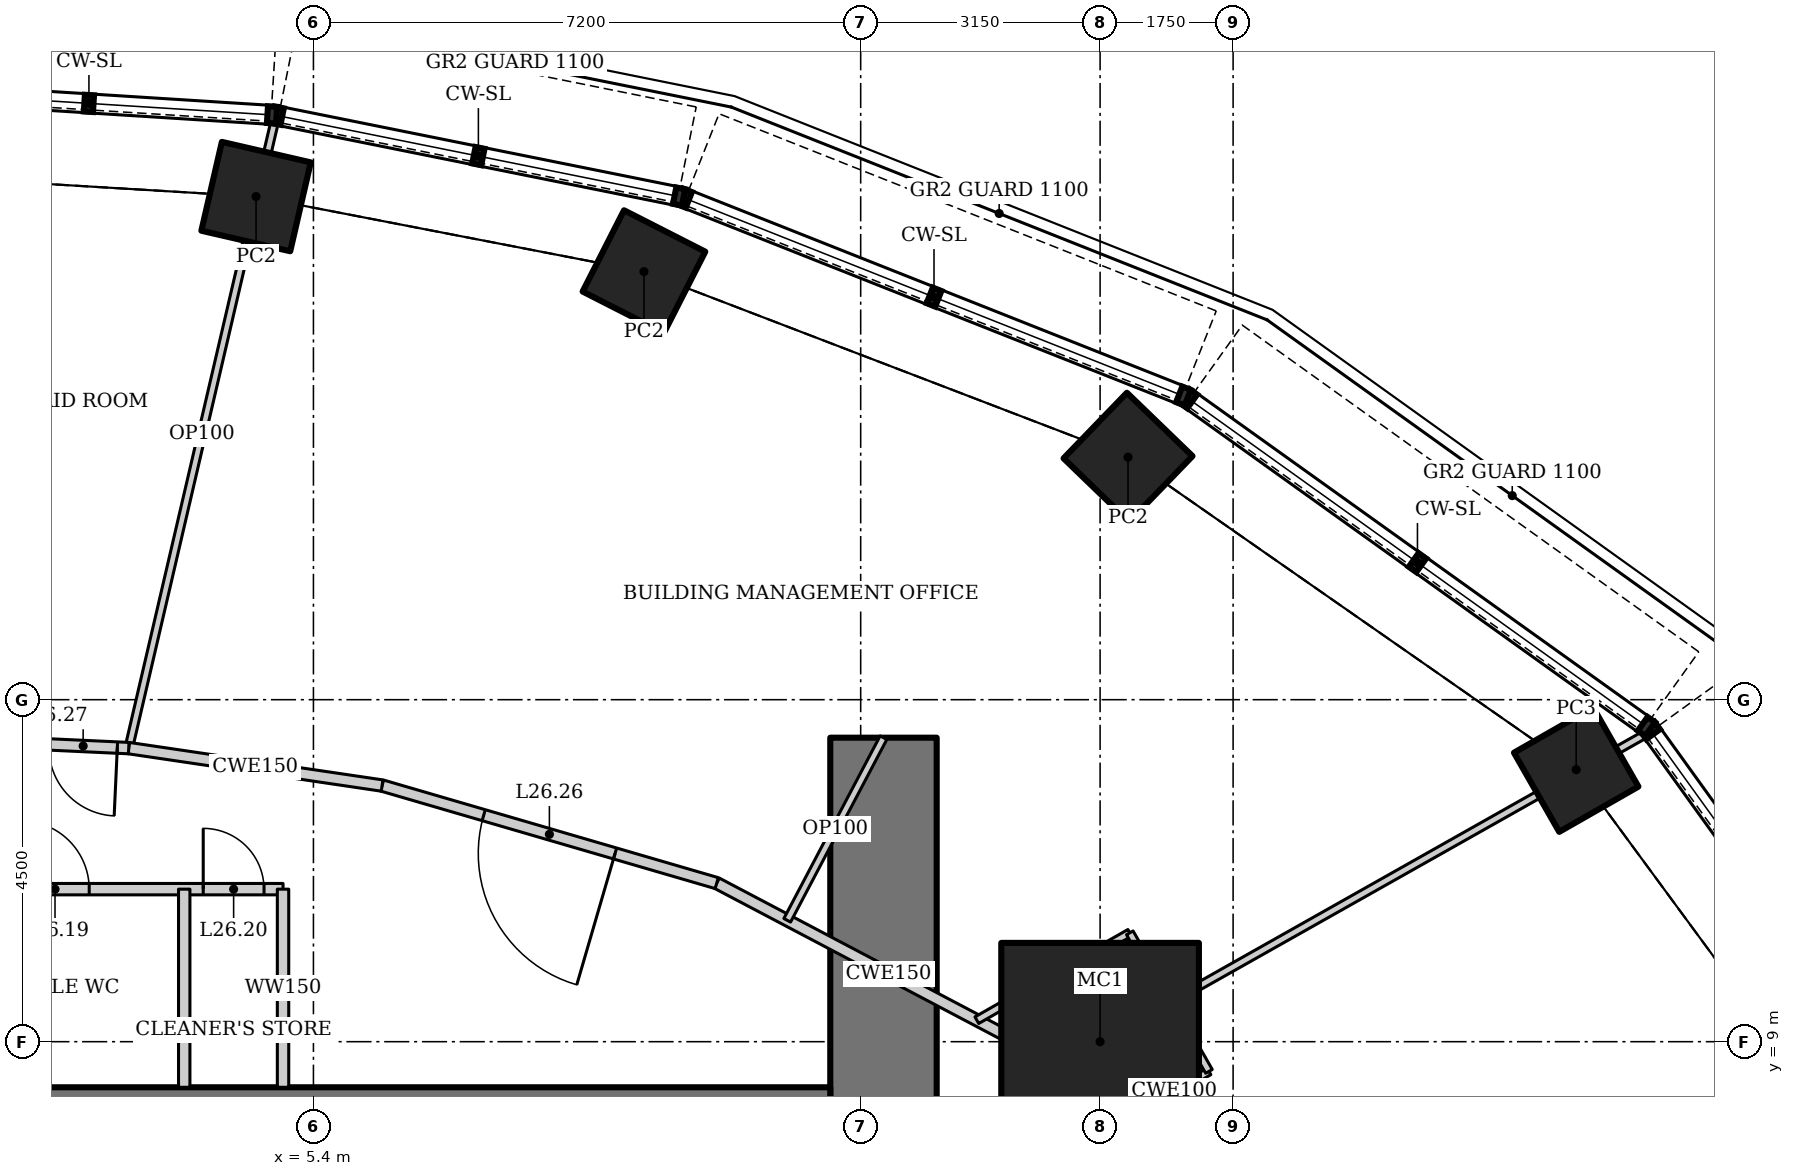
"""IFC4 building model, lengths in metres.
Left out: names, types, materials, properties, quantities, classifications, styles, units other than length and angle.
Written with IfcOpenShell. Run it as: python <this file> out.ifc"""

import sys

from ifc_helpers import new_model, si_unit, direction, frame, frame_2d, origin, origin_2d, place, context, subcontext, project, spatial, rectangle, hollow_rectangle, extrude, element, fill, save


model = new_model("IFC4")
c1 = context("Model", 3, precision=1e-05, world=origin(), true_north=direction((0.0, 1.0)))
c2 = subcontext(c1, "Body", "Model", "MODEL_VIEW")
j1 = project(units=[si_unit("LENGTHUNIT", "METRE"), si_unit("PLANEANGLEUNIT", "RADIAN")], contexts=[c1])
p1 = place(None, origin())
s1 = spatial("IfcSite", under=j1, at=p1, CompositionType="ELEMENT")
p2 = place(p1, origin())
s2 = spatial("IfcBuilding", under=s1, at=p2, CompositionType="ELEMENT")
p3 = place(p2, frame((0.0, 0.0, 111.4)))
s3 = spatial("IfcBuildingStorey", under=s2, at=p3, CompositionType="ELEMENT", Elevation=111.4)
p4 = place(p3, frame((15.75, 9.0, 0.0), z_axis=(0.0, 0.0, 1.0), x_axis=(1.0, 0.0, 0.0)))
e1 = element("IfcColumn", 1, at=p4, inside=s3, PredefinedType="COLUMN", context=c2, shape_type="SweptSolid", body=[
    extrude(hollow_rectangle(XDim=2.6, YDim=2.6, WallThickness=0.13, at=origin_2d()), origin(), (0.0, 0.0, 1.0), 6.0),
])
p5 = place(p3, frame((22.014, 12.579, 1.142), z_axis=(0.0, 0.0, 1.0), x_axis=(0.86824298017, 0.496139221777, 0.0)))
e2 = element("IfcColumn", 2, at=p5, inside=s3, PredefinedType="COLUMN", context=c2, shape_type="SweptSolid", body=[
    extrude(hollow_rectangle(XDim=1.2, YDim=1.2, WallThickness=0.12, at=origin_2d()), origin(), (0.0, 0.0, 1.0), 4.858),
])
p6 = place(p3, frame((16.118, 16.69, 1.155), z_axis=(0.0, 0.0, 1.0), x_axis=(0.694658370459, 0.719339800339, 0.0)))
e3 = element("IfcColumn", 3, at=p6, inside=s3, PredefinedType="COLUMN", context=c2, shape_type="SweptSolid", body=[
    extrude(hollow_rectangle(XDim=1.2, YDim=1.2, WallThickness=0.1, at=origin_2d()), origin(), (0.0, 0.0, 1.0), 4.845),
])
p7 = place(p3, frame((9.749, 19.133, 1.165), z_axis=(0.0, 0.0, 1.0), x_axis=(0.45399049974, 0.891006524188, 0.0)))
e4 = element("IfcColumn", 4, at=p7, inside=s3, PredefinedType="COLUMN", context=c2, shape_type="SweptSolid", body=[
    extrude(hollow_rectangle(XDim=1.2, YDim=1.2, WallThickness=0.1, at=origin_2d()), origin(), (0.0, 0.0, 1.0), 4.835),
])
p8 = place(p3, frame((4.645, 20.12, 1.17), z_axis=(0.0, 0.0, 1.0), x_axis=(0.224951054344, 0.974370064785, 0.0)))
e5 = element("IfcColumn", 5, at=p8, inside=s3, PredefinedType="COLUMN", context=c2, shape_type="SweptSolid", body=[
    extrude(hollow_rectangle(XDim=1.2, YDim=1.2, WallThickness=0.1, at=origin_2d()), origin(), (0.0, 0.0, 1.0), 4.83),
])
p9 = place(p3, frame((12.9, -13.0, 0.0), z_axis=(0.0, 0.0, 1.0), x_axis=(0.0, 1.0, 0.0)))
e6 = element("IfcWall", 6, at=p9, inside=s3, PredefinedType="SHEAR", context=c2, shape_type="SweptSolid", body=[
    extrude(rectangle(XDim=26.0, YDim=1.4, at=frame_2d((13.0, 0.0))), origin(), (0.0, 0.0, 1.0), 6.0),
])
p10 = place(p9, frame((13.75, 0.0, 0.0)))
e7 = element("IfcOpeningElement", 7, at=p10, cuts=e6, PredefinedType="OPENING", context=c2, shape_type="SweptSolid", body=[
    extrude(rectangle(XDim=1.8, YDim=2.1, at=frame_2d((0.9, 1.05))), frame((0.0, 0.71, 0.0), z_axis=(0.0, -1.0, 0.0), x_axis=(1.0, 0.0, 0.0)), (0.0, 0.0, 1.0), 1.42),
])
p11 = place(p3, frame((12.2, 7.6, 0.0), z_axis=(0.0, 0.0, 1.0), x_axis=(-1.0, 0.0, 0.0)))
e8 = element("IfcWall", 8, at=p11, inside=s3, PredefinedType="SHEAR", context=c2, shape_type="SweptSolid", body=[
    extrude(rectangle(XDim=24.4, YDim=1.6, at=frame_2d((12.2, 0.0))), origin(), (0.0, 0.0, 1.0), 6.0),
])
p12 = place(p3, frame((22.949, 13.059, 0.0), z_axis=(0.0, 0.0, 1.0), x_axis=(-0.870889908693, -0.491478144923, 0.0)))
e9 = element("IfcWall", 9, at=p12, inside=s3, PredefinedType="PARTITIONING", context=c2, shape_type="SweptSolid", body=[
    extrude(rectangle(XDim=8.865, YDim=0.1, at=frame_2d((4.432, 0.0))), origin(), (0.0, 0.0, 1.0), 4.65),
])
p13 = place(p3, frame((4.897, 21.135, 0.0), z_axis=(0.0, 0.0, 1.0), x_axis=(-0.226907932986, -0.973916213002, 0.0)))
e10 = element("IfcWall", 10, at=p13, inside=s3, PredefinedType="PARTITIONING", context=c2, shape_type="SweptSolid", body=[
    extrude(rectangle(XDim=8.493, YDim=0.1, at=frame_2d((4.247, 0.0))), origin(), (0.0, 0.0, 1.0), 5.149),
])
p14 = place(p3, frame((19.078, 4.757, 0.0), z_axis=(0.0, 0.0, 1.0), x_axis=(-0.698305033542, 0.715800307439, 0.0)))
e11 = element("IfcWall", 11, at=p14, inside=s3, PredefinedType="PARTITIONING", context=c2, shape_type="SweptSolid", body=[
    extrude(rectangle(XDim=5.512, YDim=0.15, at=frame_2d((2.756, 0.0))), origin(), (0.0, 0.0, 1.0), 5.85),
])
p15 = place(p14, frame((0.15, 0.0, 0.0)))
e12 = element("IfcOpeningElement", 12, at=p15, cuts=e11, PredefinedType="OPENING", context=c2, shape_type="SweptSolid", body=[
    extrude(rectangle(XDim=0.9, YDim=2.1, at=frame_2d((0.45, 1.05))), frame((0.0, 0.085, 0.0), z_axis=(0.0, -1.0, 0.0), x_axis=(1.0, 0.0, 0.0)), (0.0, 0.0, 1.0), 0.17),
])
p16 = place(p3, frame((15.229, 8.702, 0.0), z_axis=(0.0, 0.0, 1.0), x_axis=(-0.884643590306, 0.466267860924, 0.0)))
e13 = element("IfcWall", 13, at=p16, inside=s3, PredefinedType="PARTITIONING", context=c2, shape_type="SweptSolid", body=[
    extrude(rectangle(XDim=5.113, YDim=0.15, at=frame_2d((2.557, 0.0))), origin(), (0.0, 0.0, 1.0), 5.85),
])
p17 = place(p3, frame((10.706, 11.086, 0.0), z_axis=(0.0, 0.0, 1.0), x_axis=(-0.96001728753, 0.279940721659, 0.0)))
e14 = element("IfcWall", 14, at=p17, inside=s3, PredefinedType="PARTITIONING", context=c2, shape_type="SweptSolid", body=[
    extrude(rectangle(XDim=4.586, YDim=0.15, at=frame_2d((2.293, 0.0))), origin(), (0.0, 0.0, 1.0), 5.85),
])
p18 = place(p17, frame((1.393, 0.0, 0.0)))
e15 = element("IfcOpeningElement", 15, at=p18, cuts=e14, PredefinedType="OPENING", context=c2, shape_type="SweptSolid", body=[
    extrude(rectangle(XDim=1.8, YDim=2.1, at=frame_2d((0.9, 1.05))), frame((0.0, 0.085, 0.0), z_axis=(0.0, -1.0, 0.0), x_axis=(1.0, 0.0, 0.0)), (0.0, 0.0, 1.0), 0.17),
])
p19 = place(p3, frame((6.303, 12.37, 0.0), z_axis=(0.0, 0.0, 1.0), x_axis=(-0.989262902935, 0.146146874329, 0.0)))
e16 = element("IfcWall", 16, at=p19, inside=s3, PredefinedType="PARTITIONING", context=c2, shape_type="SweptSolid", body=[
    extrude(rectangle(XDim=3.369, YDim=0.15, at=frame_2d((1.685, 0.0))), origin(), (0.0, 0.0, 1.0), 5.85),
])
p20 = place(p3, frame((2.97, 12.863, 0.0), z_axis=(0.0, 0.0, 1.0), x_axis=(-0.998934397568, 0.046152674403, 0.0)))
e17 = element("IfcWall", 17, at=p20, inside=s3, PredefinedType="PARTITIONING", context=c2, shape_type="SweptSolid", body=[
    extrude(rectangle(XDim=2.973, YDim=0.15, at=frame_2d((1.486, 0.0))), origin(), (0.0, 0.0, 1.0), 5.85),
])
p21 = place(p20, frame((0.15, 0.0, 0.0)))
e18 = element("IfcOpeningElement", 18, at=p21, cuts=e17, PredefinedType="OPENING", context=c2, shape_type="SweptSolid", body=[
    extrude(rectangle(XDim=0.9, YDim=2.1, at=frame_2d((0.45, 1.05))), frame((0.0, 0.085, 0.0), z_axis=(0.0, -1.0, 0.0), x_axis=(1.0, 0.0, 0.0)), (0.0, 0.0, 1.0), 0.17),
])
p22 = place(p3, frame((-5.0, 11.007, 0.0), z_axis=(0.0, 0.0, 1.0), x_axis=(1.0, 0.0, 0.0)))
e19 = element("IfcWall", 19, at=p22, inside=s3, PredefinedType="SOLIDWALL", context=c2, shape_type="SweptSolid", body=[
    extrude(rectangle(XDim=10.0, YDim=0.15, at=frame_2d((5.0, 0.0))), origin(), (0.0, 0.0, 1.0), 5.85),
])
p23 = place(p22, frame((0.45, 0.0, 0.0)))
e20 = element("IfcOpeningElement", 20, at=p23, cuts=e19, PredefinedType="OPENING", context=c2, shape_type="SweptSolid", body=[
    extrude(rectangle(XDim=1.0, YDim=2.1, at=frame_2d((0.5, 1.05))), frame((0.0, 0.085, 0.0), z_axis=(0.0, -1.0, 0.0), x_axis=(1.0, 0.0, 0.0)), (0.0, 0.0, 1.0), 0.17),
])
p24 = place(p22, frame((3.15, 0.0, 0.0)))
e21 = element("IfcOpeningElement", 21, at=p24, cuts=e19, PredefinedType="OPENING", context=c2, shape_type="SweptSolid", body=[
    extrude(rectangle(XDim=0.9, YDim=2.1, at=frame_2d((0.45, 1.05))), frame((0.0, 0.085, 0.0), z_axis=(0.0, -1.0, 0.0), x_axis=(1.0, 0.0, 0.0)), (0.0, 0.0, 1.0), 0.17),
])
p25 = place(p22, frame((6.55, 0.0, 0.0)))
e22 = element("IfcOpeningElement", 22, at=p25, cuts=e19, PredefinedType="OPENING", context=c2, shape_type="SweptSolid", body=[
    extrude(rectangle(XDim=0.9, YDim=2.1, at=frame_2d((0.45, 1.05))), frame((0.0, 0.085, 0.0), z_axis=(0.0, -1.0, 0.0), x_axis=(1.0, 0.0, 0.0)), (0.0, 0.0, 1.0), 0.17),
])
p26 = place(p22, frame((8.95, 0.0, 0.0)))
e23 = element("IfcOpeningElement", 23, at=p26, cuts=e19, PredefinedType="OPENING", context=c2, shape_type="SweptSolid", body=[
    extrude(rectangle(XDim=0.8, YDim=2.1, at=frame_2d((0.4, 1.05))), frame((0.0, 0.085, 0.0), z_axis=(0.0, -1.0, 0.0), x_axis=(1.0, 0.0, 0.0)), (0.0, 0.0, 1.0), 0.17),
])
for number, where, z_axis, x_axis in (
    (24, (5.0, 8.4, 0.0), (0.0, 0.0, 1.0), (0.0, 1.0, 0.0)),
    (25, (3.7, 8.4, 0.0), (0.0, 0.0, 1.0), (0.0, 1.0, 0.0)),
):
    element("IfcWall", number, at=place(p3, frame(where, z_axis=z_axis, x_axis=x_axis)), inside=s3, PredefinedType="SOLIDWALL", context=c2, shape_type="SweptSolid", body=[
        extrude(rectangle(XDim=2.607, YDim=0.15, at=frame_2d((1.304, 0.0))), origin(), (0.0, 0.0, 1.0), 5.85),
    ])
p27 = place(p3, frame((17.183, 8.609, 0.0), z_axis=(0.0, 0.0, 1.0), x_axis=(-0.868214523334, -0.496189017888, 0.0)))
e26 = element("IfcWall", 26, at=p27, inside=s3, PredefinedType="PARTITIONING", context=c2, shape_type="SweptSolid", body=[
    extrude(rectangle(XDim=1.05, YDim=0.1, at=frame_2d((0.525, 0.0))), origin(), (0.0, 0.0, 1.0), 5.85),
])
p28 = place(p3, frame((14.128, 9.283, 0.0), z_axis=(0.0, 0.0, 1.0), x_axis=(0.868290539594, 0.496055983587, 0.0)))
e27 = element("IfcWall", 27, at=p28, inside=s3, PredefinedType="PARTITIONING", context=c2, shape_type="SweptSolid", body=[
    extrude(rectangle(XDim=1.268, YDim=0.1, at=frame_2d((0.634, 0.0))), origin(), (0.0, 0.0, 1.0), 5.85),
])
for number, where, z_axis, x_axis in (
    (28, (15.229, 9.912, 0.0), (0.0, 0.0, 1.0), (0.868, 0.496, 0.0)),
    (29, (16.141, 10.433, 0.0), (0.0, 0.0, 1.0), (0.496, -0.868, 0.0)),
):
    element("IfcWall", number, at=place(p3, frame(where, z_axis=z_axis, x_axis=x_axis)), inside=s3, PredefinedType="PARTITIONING", context=c2, shape_type="SweptSolid", body=[
        extrude(rectangle(XDim=1.05, YDim=0.1, at=frame_2d((0.525, 0.0))), origin(), (0.0, 0.0, 1.0), 5.85),
    ])
p29 = place(p3, frame((16.666, 9.513, 0.0), z_axis=(0.0, 0.0, 1.0), x_axis=(0.49623995811, -0.868185408755, 0.0)))
e30 = element("IfcWall", 30, at=p29, inside=s3, PredefinedType="PARTITIONING", context=c2, shape_type="SweptSolid", body=[
    extrude(rectangle(XDim=1.041, YDim=0.1, at=frame_2d((0.521, 0.0))), origin(), (0.0, 0.0, 1.0), 5.85),
])
p30 = place(p3, frame((12.9, 13.0, 0.0), z_axis=(0.0, 0.0, 1.0), x_axis=(-0.466205800243, -0.884676297761, 0.0)))
e31 = element("IfcWall", 31, at=p30, inside=s3, PredefinedType="PARTITIONING", context=c2, shape_type="SweptSolid", body=[
    extrude(rectangle(XDim=2.716, YDim=0.1, at=frame_2d((1.358, 0.0))), origin(), (0.0, 0.0, 1.0), 5.85),
])
p31 = place(p25, origin())
e32 = element("IfcDoor", 32, at=p31, inside=s3, OperationType="SINGLE_SWING_LEFT", PredefinedType="DOOR", context=c2, shape_type="SweptSolid", body=[
    extrude(rectangle(XDim=0.9, YDim=2.1, at=frame_2d((0.45, 1.05))), frame((0.0, 0.025, 0.0), z_axis=(0.0, -1.0, 0.0), x_axis=(1.0, 0.0, 0.0)), (0.0, 0.0, 1.0), 0.05),
])
fill(e22, e32)
p32 = place(p26, origin())
e33 = element("IfcDoor", 33, at=p32, inside=s3, OperationType="SINGLE_SWING_LEFT", PredefinedType="DOOR", context=c2, shape_type="SweptSolid", body=[
    extrude(rectangle(XDim=0.8, YDim=2.1, at=frame_2d((0.4, 1.05))), frame((0.0, 0.025, 0.0), z_axis=(0.0, -1.0, 0.0), x_axis=(1.0, 0.0, 0.0)), (0.0, 0.0, 1.0), 0.05),
])
fill(e23, e33)
p33 = place(p18, origin())
e34 = element("IfcDoor", 34, at=p33, inside=s3, OperationType="DOUBLE_DOOR_DOUBLE_SWING", PredefinedType="DOOR", context=c2, shape_type="SweptSolid", body=[
    extrude(rectangle(XDim=1.8, YDim=2.1, at=frame_2d((0.9, 1.05))), frame((0.0, 0.025, 0.0), z_axis=(0.0, -1.0, 0.0), x_axis=(1.0, 0.0, 0.0)), (0.0, 0.0, 1.0), 0.05),
])
fill(e15, e34)
p34 = place(p21, origin())
e35 = element("IfcDoor", 35, at=p34, inside=s3, OperationType="SINGLE_SWING_LEFT", PredefinedType="DOOR", context=c2, shape_type="SweptSolid", body=[
    extrude(rectangle(XDim=0.9, YDim=2.1, at=frame_2d((0.45, 1.05))), frame((0.0, 0.025, 0.0), z_axis=(0.0, -1.0, 0.0), x_axis=(1.0, 0.0, 0.0)), (0.0, 0.0, 1.0), 0.05),
])
fill(e18, e35)
save(model, sys.argv[1])
